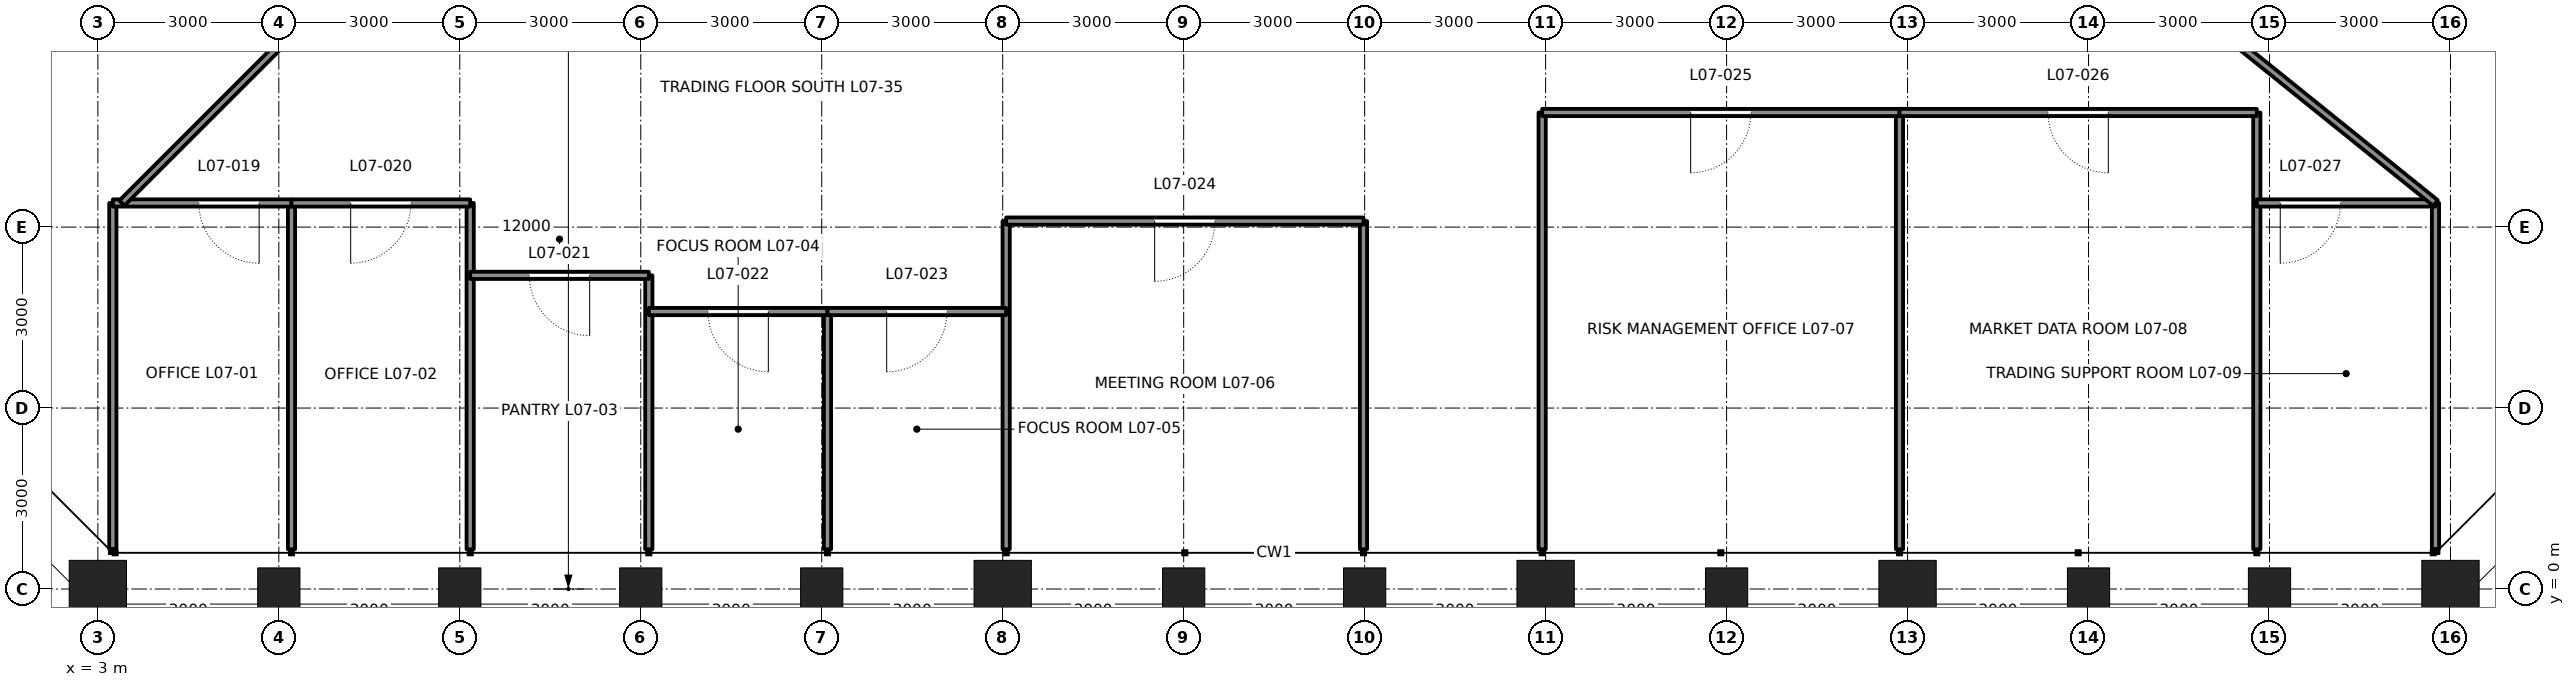
"""IFC4 building model, lengths in metres.
Left out: names, types, materials, properties, quantities, classifications, styles, units other than length and angle.
Written with IfcOpenShell. Run it as: python <this file> out.ifc"""

import sys

from ifc_helpers import new_model, si_unit, direction, frame, frame_2d, origin, origin_2d, place, context, subcontext, project, spatial, rectangle, hollow_rectangle, extrude, element, fill, save


model = new_model("IFC4")
c1 = context("Model", 3, precision=1e-05, world=origin(), true_north=direction((0.0, 1.0)))
c2 = subcontext(c1, "Body", "Model", "MODEL_VIEW")
j1 = project(units=[si_unit("LENGTHUNIT", "METRE"), si_unit("PLANEANGLEUNIT", "RADIAN")], contexts=[c1])
p1 = place(None, origin())
s1 = spatial("IfcSite", under=j1, at=p1, CompositionType="ELEMENT")
p2 = place(p1, origin())
s2 = spatial("IfcBuilding", under=s1, at=p2, CompositionType="ELEMENT")
p3 = place(p2, frame((0.0, 0.0, 37.8)))
s3 = spatial("IfcBuildingStorey", under=s2, at=p3, CompositionType="ELEMENT", Elevation=37.8)
p4 = place(p3, frame((3.0, 0.0, 0.0), z_axis=(0.0, 0.0, 1.0), x_axis=(0.0, -1.0, 0.0)))
e1 = element("IfcColumn", 1, at=p4, inside=s3, PredefinedType="COLUMN", context=c2, shape_type="SweptSolid", body=[
    extrude(hollow_rectangle(XDim=0.95, YDim=0.95, WallThickness=0.095, at=origin_2d()), origin(), (0.0, 0.0, 1.0), 4.5),
])
for number, where, z_axis, x_axis in (
    (2, (6.0, 0.0, 0.0), (0.0, 0.0, 1.0), (0.0, -1.0, 0.0)),
    (3, (9.0, 0.0, 0.0), (0.0, 0.0, 1.0), (0.0, -1.0, 0.0)),
    (4, (12.0, 0.0, 0.0), (0.0, 0.0, 1.0), (0.0, -1.0, 0.0)),
    (5, (15.0, 0.0, 0.0), (0.0, 0.0, 1.0), (0.0, -1.0, 0.0)),
):
    element("IfcColumn", number, at=place(p3, frame(where, z_axis=z_axis, x_axis=x_axis)), inside=s3, PredefinedType="COLUMN", context=c2, shape_type="SweptSolid", body=[
        extrude(hollow_rectangle(XDim=0.7, YDim=0.7, WallThickness=0.07, at=origin_2d()), origin(), (0.0, 0.0, 1.0), 4.5),
    ])
p5 = place(p3, frame((18.0, 0.0, 0.0), z_axis=(0.0, 0.0, 1.0), x_axis=(0.0, -1.0, 0.0)))
e6 = element("IfcColumn", 6, at=p5, inside=s3, PredefinedType="COLUMN", context=c2, shape_type="SweptSolid", body=[
    extrude(hollow_rectangle(XDim=0.95, YDim=0.95, WallThickness=0.11, at=origin_2d()), origin(), (0.0, 0.0, 1.0), 4.5),
])
for number, where, z_axis, x_axis in (
    (7, (21.0, 0.0, 0.0), (0.0, 0.0, 1.0), (0.0, -1.0, 0.0)),
    (8, (24.0, 0.0, 0.0), (0.0, 0.0, 1.0), (0.0, -1.0, 0.0)),
):
    element("IfcColumn", number, at=place(p3, frame(where, z_axis=z_axis, x_axis=x_axis)), inside=s3, PredefinedType="COLUMN", context=c2, shape_type="SweptSolid", body=[
        extrude(hollow_rectangle(XDim=0.7, YDim=0.7, WallThickness=0.07, at=origin_2d()), origin(), (0.0, 0.0, 1.0), 4.5),
    ])
p6 = place(p3, frame((27.0, 0.0, 0.0), z_axis=(0.0, 0.0, 1.0), x_axis=(0.0, -1.0, 0.0)))
e9 = element("IfcColumn", 9, at=p6, inside=s3, PredefinedType="COLUMN", context=c2, shape_type="SweptSolid", body=[
    extrude(hollow_rectangle(XDim=0.95, YDim=0.95, WallThickness=0.11, at=origin_2d()), origin(), (0.0, 0.0, 1.0), 4.5),
])
p7 = place(p3, frame((30.0, 0.0, 0.0), z_axis=(0.0, 0.0, 1.0), x_axis=(0.0, -1.0, 0.0)))
e10 = element("IfcColumn", 10, at=p7, inside=s3, PredefinedType="COLUMN", context=c2, shape_type="SweptSolid", body=[
    extrude(hollow_rectangle(XDim=0.7, YDim=0.7, WallThickness=0.07, at=origin_2d()), origin(), (0.0, 0.0, 1.0), 4.5),
])
p8 = place(p3, frame((33.0, 0.0, 0.0), z_axis=(0.0, 0.0, 1.0), x_axis=(0.0, -1.0, 0.0)))
e11 = element("IfcColumn", 11, at=p8, inside=s3, PredefinedType="COLUMN", context=c2, shape_type="SweptSolid", body=[
    extrude(hollow_rectangle(XDim=0.95, YDim=0.95, WallThickness=0.11, at=origin_2d()), origin(), (0.0, 0.0, 1.0), 4.5),
])
for number, where, z_axis, x_axis in (
    (12, (36.0, 0.0, 0.0), (0.0, 0.0, 1.0), (0.0, -1.0, 0.0)),
    (13, (39.0, 0.0, 0.0), (0.0, 0.0, 1.0), (0.0, -1.0, 0.0)),
):
    element("IfcColumn", number, at=place(p3, frame(where, z_axis=z_axis, x_axis=x_axis)), inside=s3, PredefinedType="COLUMN", context=c2, shape_type="SweptSolid", body=[
        extrude(hollow_rectangle(XDim=0.7, YDim=0.7, WallThickness=0.07, at=origin_2d()), origin(), (0.0, 0.0, 1.0), 4.5),
    ])
p9 = place(p3, frame((42.0, 0.0, 0.0), z_axis=(0.0, 0.0, 1.0), x_axis=(0.0, -1.0, 0.0)))
e14 = element("IfcColumn", 14, at=p9, inside=s3, PredefinedType="COLUMN", context=c2, shape_type="SweptSolid", body=[
    extrude(hollow_rectangle(XDim=0.95, YDim=0.95, WallThickness=0.095, at=origin_2d()), origin(), (0.0, 0.0, 1.0), 4.5),
])
p10 = place(p3, frame((3.249, 0.666, -0.3), z_axis=(0.0, 0.0, 1.0), x_axis=(0.0, 1.0, 0.0)))
e15 = element("IfcWall", 15, at=p10, inside=s3, PredefinedType="PARTITIONING", context=c2, shape_type="SweptSolid", body=[
    extrude(rectangle(XDim=5.734, YDim=0.12, at=frame_2d((2.867, 0.0))), origin(), (0.0, 0.0, 1.0), 4.34),
])
for number, where, z_axis, x_axis in (
    (16, (6.21, 0.657, -0.3), (0.0, 0.0, 1.0), (0.0, 1.0, 0.0)),
    (17, (9.172, 0.657, -0.3), (0.0, 0.0, 1.0), (0.0, 1.0, 0.0)),
):
    element("IfcWall", number, at=place(p3, frame(where, z_axis=z_axis, x_axis=x_axis)), inside=s3, PredefinedType="PARTITIONING", context=c2, shape_type="SweptSolid", body=[
        extrude(rectangle(XDim=5.742, YDim=0.12, at=frame_2d((2.871, 0.0))), origin(), (0.0, 0.0, 1.0), 4.34),
    ])
p11 = place(p3, frame((12.134, 0.657, -0.3), z_axis=(0.0, 0.0, 1.0), x_axis=(0.0, 1.0, 0.0)))
e18 = element("IfcWall", 18, at=p11, inside=s3, PredefinedType="PARTITIONING", context=c2, shape_type="SweptSolid", body=[
    extrude(rectangle(XDim=4.542, YDim=0.12, at=frame_2d((2.271, 0.0))), origin(), (0.0, 0.0, 1.0), 3.481),
])
p12 = place(p3, frame((15.096, 0.657, -0.3), z_axis=(0.0, 0.0, 1.0), x_axis=(0.0, 1.0, 0.0)))
e19 = element("IfcWall", 19, at=p12, inside=s3, PredefinedType="PARTITIONING", context=c2, shape_type="SweptSolid", body=[
    extrude(rectangle(XDim=3.943, YDim=0.12, at=frame_2d((1.971, 0.0))), origin(), (0.0, 0.0, 1.0), 3.646),
])
for number, where, z_axis, x_axis in (
    (20, (18.057, 0.657, -0.3), (0.0, 0.0, 1.0), (0.0, 1.0, 0.0)),
    (21, (23.981, 0.657, -0.3), (0.0, 0.0, 1.0), (0.0, 1.0, 0.0)),
):
    element("IfcWall", number, at=place(p3, frame(where, z_axis=z_axis, x_axis=x_axis)), inside=s3, PredefinedType="PARTITIONING", context=c2, shape_type="SweptSolid", body=[
        extrude(rectangle(XDim=5.443, YDim=0.12, at=frame_2d((2.721, 0.0))), origin(), (0.0, 0.0, 1.0), 3.646),
    ])
p13 = place(p3, frame((26.943, 0.657, -0.3), z_axis=(0.0, 0.0, 1.0), x_axis=(0.0, 1.0, 0.0)))
e22 = element("IfcWall", 22, at=p13, inside=s3, PredefinedType="PARTITIONING", context=c2, shape_type="SweptSolid", body=[
    extrude(rectangle(XDim=7.242, YDim=0.12, at=frame_2d((3.621, 0.0))), origin(), (0.0, 0.0, 1.0), 3.646),
])
p14 = place(p3, frame((32.866, 0.657, -0.3), z_axis=(0.0, 0.0, 1.0), x_axis=(0.0, 1.0, 0.0)))
e23 = element("IfcWall", 23, at=p14, inside=s3, PredefinedType="PARTITIONING", context=c2, shape_type="SweptSolid", body=[
    extrude(rectangle(XDim=7.242, YDim=0.12, at=frame_2d((3.621, 0.0))), origin(), (0.0, 0.0, 1.0), 3.481),
])
p15 = place(p3, frame((38.79, 0.657, -0.3), z_axis=(0.0, 0.0, 1.0), x_axis=(0.0, 1.0, 0.0)))
e24 = element("IfcWall", 24, at=p15, inside=s3, PredefinedType="PARTITIONING", context=c2, shape_type="SweptSolid", body=[
    extrude(rectangle(XDim=7.242, YDim=0.12, at=frame_2d((3.621, 0.0))), origin(), (0.0, 0.0, 1.0), 4.34),
])
p16 = place(p3, frame((41.751, 0.666, -0.3), z_axis=(0.0, 0.0, 1.0), x_axis=(0.0, 1.0, 0.0)))
e25 = element("IfcWall", 25, at=p16, inside=s3, PredefinedType="PARTITIONING", context=c2, shape_type="SweptSolid", body=[
    extrude(rectangle(XDim=5.734, YDim=0.12, at=frame_2d((2.867, 0.0))), origin(), (0.0, 0.0, 1.0), 4.34),
])
p17 = place(p3, frame((3.249, 6.4, -0.3), z_axis=(0.0, 0.0, 1.0), x_axis=(1.0, 0.0, 0.0)))
e26 = element("IfcWall", 26, at=p17, inside=s3, PredefinedType="PARTITIONING", context=c2, shape_type="SweptSolid", body=[
    extrude(rectangle(XDim=2.962, YDim=0.12, at=frame_2d((1.481, 0.0))), origin(), (0.0, 0.0, 1.0), 4.34),
])
p18 = place(p17, frame((1.425, 0.0, 0.3)))
e27 = element("IfcOpeningElement", 27, at=p18, cuts=e26, PredefinedType="OPENING", context=c2, shape_type="SweptSolid", body=[
    extrude(rectangle(XDim=1.0, YDim=2.4, at=frame_2d((0.5, 1.2))), frame((0.0, 0.07, 0.0), z_axis=(0.0, -1.0, 0.0), x_axis=(1.0, 0.0, 0.0)), (0.0, 0.0, 1.0), 0.14),
])
p19 = place(p3, frame((6.21, 6.4, -0.3), z_axis=(0.0, 0.0, 1.0), x_axis=(1.0, 0.0, 0.0)))
e28 = element("IfcWall", 28, at=p19, inside=s3, PredefinedType="PARTITIONING", context=c2, shape_type="SweptSolid", body=[
    extrude(rectangle(XDim=2.962, YDim=0.12, at=frame_2d((1.481, 0.0))), origin(), (0.0, 0.0, 1.0), 4.34),
])
p20 = place(p19, frame((0.981, 0.0, 0.3)))
e29 = element("IfcOpeningElement", 29, at=p20, cuts=e28, PredefinedType="OPENING", context=c2, shape_type="SweptSolid", body=[
    extrude(rectangle(XDim=1.0, YDim=2.4, at=frame_2d((0.5, 1.2))), frame((0.0, 0.07, 0.0), z_axis=(0.0, -1.0, 0.0), x_axis=(1.0, 0.0, 0.0)), (0.0, 0.0, 1.0), 0.14),
])
p21 = place(p3, frame((9.172, 5.2, -0.3), z_axis=(0.0, 0.0, 1.0), x_axis=(1.0, 0.0, 0.0)))
e30 = element("IfcWall", 30, at=p21, inside=s3, PredefinedType="PARTITIONING", context=c2, shape_type="SweptSolid", body=[
    extrude(rectangle(XDim=2.962, YDim=0.12, at=frame_2d((1.481, 0.0))), origin(), (0.0, 0.0, 1.0), 4.34),
])
p22 = place(p21, frame((0.981, 0.0, 0.3)))
e31 = element("IfcOpeningElement", 31, at=p22, cuts=e30, PredefinedType="OPENING", context=c2, shape_type="SweptSolid", body=[
    extrude(rectangle(XDim=1.0, YDim=2.4, at=frame_2d((0.5, 1.2))), frame((0.0, 0.07, 0.0), z_axis=(0.0, -1.0, 0.0), x_axis=(1.0, 0.0, 0.0)), (0.0, 0.0, 1.0), 0.14),
])
p23 = place(p3, frame((12.134, 4.6, -0.3), z_axis=(0.0, 0.0, 1.0), x_axis=(1.0, 0.0, 0.0)))
e32 = element("IfcWall", 32, at=p23, inside=s3, PredefinedType="PARTITIONING", context=c2, shape_type="SweptSolid", body=[
    extrude(rectangle(XDim=2.962, YDim=0.12, at=frame_2d((1.481, 0.0))), origin(), (0.0, 0.0, 1.0), 4.34),
])
p24 = place(p23, frame((0.981, 0.0, 0.3)))
e33 = element("IfcOpeningElement", 33, at=p24, cuts=e32, PredefinedType="OPENING", context=c2, shape_type="SweptSolid", body=[
    extrude(rectangle(XDim=1.0, YDim=2.4, at=frame_2d((0.5, 1.2))), frame((0.0, 0.07, 0.0), z_axis=(0.0, -1.0, 0.0), x_axis=(1.0, 0.0, 0.0)), (0.0, 0.0, 1.0), 0.14),
])
p25 = place(p3, frame((15.096, 4.6, -0.3), z_axis=(0.0, 0.0, 1.0), x_axis=(1.0, 0.0, 0.0)))
e34 = element("IfcWall", 34, at=p25, inside=s3, PredefinedType="PARTITIONING", context=c2, shape_type="SweptSolid", body=[
    extrude(rectangle(XDim=2.962, YDim=0.12, at=frame_2d((1.481, 0.0))), origin(), (0.0, 0.0, 1.0), 4.34),
])
p26 = place(p25, frame((0.981, 0.0, 0.3)))
e35 = element("IfcOpeningElement", 35, at=p26, cuts=e34, PredefinedType="OPENING", context=c2, shape_type="SweptSolid", body=[
    extrude(rectangle(XDim=1.0, YDim=2.4, at=frame_2d((0.5, 1.2))), frame((0.0, 0.07, 0.0), z_axis=(0.0, -1.0, 0.0), x_axis=(1.0, 0.0, 0.0)), (0.0, 0.0, 1.0), 0.14),
])
p27 = place(p3, frame((18.057, 6.1, -0.3), z_axis=(0.0, 0.0, 1.0), x_axis=(1.0, 0.0, 0.0)))
e36 = element("IfcWall", 36, at=p27, inside=s3, PredefinedType="PARTITIONING", context=c2, shape_type="SweptSolid", body=[
    extrude(rectangle(XDim=5.924, YDim=0.12, at=frame_2d((2.962, 0.0))), origin(), (0.0, 0.0, 1.0), 4.34),
])
p28 = place(p27, frame((2.462, 0.0, 0.3)))
e37 = element("IfcOpeningElement", 37, at=p28, cuts=e36, PredefinedType="OPENING", context=c2, shape_type="SweptSolid", body=[
    extrude(rectangle(XDim=1.0, YDim=2.4, at=frame_2d((0.5, 1.2))), frame((0.0, 0.07, 0.0), z_axis=(0.0, -1.0, 0.0), x_axis=(1.0, 0.0, 0.0)), (0.0, 0.0, 1.0), 0.14),
])
p29 = place(p3, frame((26.943, 7.9, -0.3), z_axis=(0.0, 0.0, 1.0), x_axis=(1.0, 0.0, 0.0)))
e38 = element("IfcWall", 38, at=p29, inside=s3, PredefinedType="PARTITIONING", context=c2, shape_type="SweptSolid", body=[
    extrude(rectangle(XDim=5.924, YDim=0.12, at=frame_2d((2.962, 0.0))), origin(), (0.0, 0.0, 1.0), 4.34),
])
p30 = place(p29, frame((2.462, 0.0, 0.3)))
e39 = element("IfcOpeningElement", 39, at=p30, cuts=e38, PredefinedType="OPENING", context=c2, shape_type="SweptSolid", body=[
    extrude(rectangle(XDim=1.0, YDim=2.4, at=frame_2d((0.5, 1.2))), frame((0.0, 0.07, 0.0), z_axis=(0.0, -1.0, 0.0), x_axis=(1.0, 0.0, 0.0)), (0.0, 0.0, 1.0), 0.14),
])
p31 = place(p3, frame((32.866, 7.9, -0.3), z_axis=(0.0, 0.0, 1.0), x_axis=(1.0, 0.0, 0.0)))
e40 = element("IfcWall", 40, at=p31, inside=s3, PredefinedType="PARTITIONING", context=c2, shape_type="SweptSolid", body=[
    extrude(rectangle(XDim=5.924, YDim=0.12, at=frame_2d((2.962, 0.0))), origin(), (0.0, 0.0, 1.0), 4.34),
])
p32 = place(p31, frame((2.462, 0.0, 0.3)))
e41 = element("IfcOpeningElement", 41, at=p32, cuts=e40, PredefinedType="OPENING", context=c2, shape_type="SweptSolid", body=[
    extrude(rectangle(XDim=1.0, YDim=2.4, at=frame_2d((0.5, 1.2))), frame((0.0, 0.07, 0.0), z_axis=(0.0, -1.0, 0.0), x_axis=(1.0, 0.0, 0.0)), (0.0, 0.0, 1.0), 0.14),
])
p33 = place(p3, frame((38.79, 6.4, -0.3), z_axis=(0.0, 0.0, 1.0), x_axis=(1.0, 0.0, 0.0)))
e42 = element("IfcWall", 42, at=p33, inside=s3, PredefinedType="PARTITIONING", context=c2, shape_type="SweptSolid", body=[
    extrude(rectangle(XDim=2.962, YDim=0.12, at=frame_2d((1.481, 0.0))), origin(), (0.0, 0.0, 1.0), 4.34),
])
p34 = place(p33, frame((0.388, 0.0, 0.3)))
e43 = element("IfcOpeningElement", 43, at=p34, cuts=e42, PredefinedType="OPENING", context=c2, shape_type="SweptSolid", body=[
    extrude(rectangle(XDim=1.0, YDim=2.4, at=frame_2d((0.5, 1.2))), frame((0.0, 0.07, 0.0), z_axis=(0.0, -1.0, 0.0), x_axis=(1.0, 0.0, 0.0)), (0.0, 0.0, 1.0), 0.14),
])
p35 = place(p3, frame((9.0, 12.0, -0.3), z_axis=(0.0, 0.0, 1.0), x_axis=(-0.707106781187, -0.707106781187, 0.0)))
e44 = element("IfcWall", 44, at=p35, inside=s3, PredefinedType="PARTITIONING", context=c2, shape_type="SweptSolid", body=[
    extrude(rectangle(XDim=7.921, YDim=0.12, at=frame_2d((3.96, 0.0))), origin(), (0.0, 0.0, 1.0), 4.34),
])
p36 = place(p35, frame((1.3, 0.0, 0.3)))
e45 = element("IfcOpeningElement", 45, at=p36, cuts=e44, PredefinedType="OPENING", context=c2, shape_type="SweptSolid", body=[
    extrude(rectangle(XDim=1.0, YDim=2.4, at=frame_2d((0.5, 1.2))), frame((0.0, 0.07, 0.0), z_axis=(0.0, -1.0, 0.0), x_axis=(1.0, 0.0, 0.0)), (0.0, 0.0, 1.0), 0.14),
])
p37 = place(p3, frame((34.8, 12.0, -0.3), z_axis=(0.0, 0.0, 1.0), x_axis=(0.778734980058, -0.627353035247, 0.0)))
e46 = element("IfcWall", 46, at=p37, inside=s3, PredefinedType="PARTITIONING", context=c2, shape_type="SweptSolid", body=[
    extrude(rectangle(XDim=8.927, YDim=0.12, at=frame_2d((4.463, 0.0))), origin(), (0.0, 0.0, 1.0), 4.34),
])
p38 = place(p37, frame((1.529, 0.0, 0.3)))
e47 = element("IfcOpeningElement", 47, at=p38, cuts=e46, PredefinedType="OPENING", context=c2, shape_type="SweptSolid", body=[
    extrude(rectangle(XDim=1.0, YDim=2.4, at=frame_2d((0.5, 1.2))), frame((0.0, 0.07, 0.0), z_axis=(0.0, -1.0, 0.0), x_axis=(1.0, 0.0, 0.0)), (0.0, 0.0, 1.0), 0.14),
])
p39 = place(p18, frame((1.0, 0.0, 0.0), z_axis=(0.0, 0.0, 1.0), x_axis=(-1.0, 0.0, 0.0)))
e48 = element("IfcDoor", 48, at=p39, inside=s3, OperationType="SINGLE_SWING_LEFT", PredefinedType="DOOR", context=c2, shape_type="SweptSolid", body=[
    extrude(rectangle(XDim=1.0, YDim=2.4, at=frame_2d((0.5, 1.2))), frame((0.0, 0.025, 0.0), z_axis=(0.0, -1.0, 0.0), x_axis=(1.0, 0.0, 0.0)), (0.0, 0.0, 1.0), 0.05),
])
fill(e27, e48)
p40 = place(p20, frame((1.0, 0.0, 0.0), z_axis=(0.0, 0.0, 1.0), x_axis=(-1.0, 0.0, 0.0)))
e49 = element("IfcDoor", 49, at=p40, inside=s3, OperationType="SINGLE_SWING_RIGHT", PredefinedType="DOOR", context=c2, shape_type="SweptSolid", body=[
    extrude(rectangle(XDim=1.0, YDim=2.4, at=frame_2d((0.5, 1.2))), frame((0.0, 0.025, 0.0), z_axis=(0.0, -1.0, 0.0), x_axis=(1.0, 0.0, 0.0)), (0.0, 0.0, 1.0), 0.05),
])
fill(e29, e49)
p41 = place(p22, frame((1.0, 0.0, 0.0), z_axis=(0.0, 0.0, 1.0), x_axis=(-1.0, 0.0, 0.0)))
e50 = element("IfcDoor", 50, at=p41, inside=s3, OperationType="SINGLE_SWING_LEFT", PredefinedType="DOOR", context=c2, shape_type="SweptSolid", body=[
    extrude(rectangle(XDim=1.0, YDim=2.4, at=frame_2d((0.5, 1.2))), frame((0.0, 0.025, 0.0), z_axis=(0.0, -1.0, 0.0), x_axis=(1.0, 0.0, 0.0)), (0.0, 0.0, 1.0), 0.05),
])
fill(e31, e50)
p42 = place(p24, frame((1.0, 0.0, 0.0), z_axis=(0.0, 0.0, 1.0), x_axis=(-1.0, 0.0, 0.0)))
e51 = element("IfcDoor", 51, at=p42, inside=s3, OperationType="SINGLE_SWING_LEFT", PredefinedType="DOOR", context=c2, shape_type="SweptSolid", body=[
    extrude(rectangle(XDim=1.0, YDim=2.4, at=frame_2d((0.5, 1.2))), frame((0.0, 0.025, 0.0), z_axis=(0.0, -1.0, 0.0), x_axis=(1.0, 0.0, 0.0)), (0.0, 0.0, 1.0), 0.05),
])
fill(e33, e51)
p43 = place(p26, frame((1.0, 0.0, 0.0), z_axis=(0.0, 0.0, 1.0), x_axis=(-1.0, 0.0, 0.0)))
e52 = element("IfcDoor", 52, at=p43, inside=s3, OperationType="SINGLE_SWING_RIGHT", PredefinedType="DOOR", context=c2, shape_type="SweptSolid", body=[
    extrude(rectangle(XDim=1.0, YDim=2.4, at=frame_2d((0.5, 1.2))), frame((0.0, 0.025, 0.0), z_axis=(0.0, -1.0, 0.0), x_axis=(1.0, 0.0, 0.0)), (0.0, 0.0, 1.0), 0.05),
])
fill(e35, e52)
p44 = place(p28, frame((1.0, 0.0, 0.0), z_axis=(0.0, 0.0, 1.0), x_axis=(-1.0, 0.0, 0.0)))
e53 = element("IfcDoor", 53, at=p44, inside=s3, OperationType="SINGLE_SWING_RIGHT", PredefinedType="DOOR", context=c2, shape_type="SweptSolid", body=[
    extrude(rectangle(XDim=1.0, YDim=2.4, at=frame_2d((0.5, 1.2))), frame((0.0, 0.025, 0.0), z_axis=(0.0, -1.0, 0.0), x_axis=(1.0, 0.0, 0.0)), (0.0, 0.0, 1.0), 0.05),
])
fill(e37, e53)
p45 = place(p30, frame((1.0, 0.0, 0.0), z_axis=(0.0, 0.0, 1.0), x_axis=(-1.0, 0.0, 0.0)))
e54 = element("IfcDoor", 54, at=p45, inside=s3, OperationType="SINGLE_SWING_RIGHT", PredefinedType="DOOR", context=c2, shape_type="SweptSolid", body=[
    extrude(rectangle(XDim=1.0, YDim=2.4, at=frame_2d((0.5, 1.2))), frame((0.0, 0.025, 0.0), z_axis=(0.0, -1.0, 0.0), x_axis=(1.0, 0.0, 0.0)), (0.0, 0.0, 1.0), 0.05),
])
fill(e39, e54)
p46 = place(p32, frame((1.0, 0.0, 0.0), z_axis=(0.0, 0.0, 1.0), x_axis=(-1.0, 0.0, 0.0)))
e55 = element("IfcDoor", 55, at=p46, inside=s3, OperationType="SINGLE_SWING_LEFT", PredefinedType="DOOR", context=c2, shape_type="SweptSolid", body=[
    extrude(rectangle(XDim=1.0, YDim=2.4, at=frame_2d((0.5, 1.2))), frame((0.0, 0.025, 0.0), z_axis=(0.0, -1.0, 0.0), x_axis=(1.0, 0.0, 0.0)), (0.0, 0.0, 1.0), 0.05),
])
fill(e41, e55)
p47 = place(p34, frame((1.0, 0.0, 0.0), z_axis=(0.0, 0.0, 1.0), x_axis=(-1.0, 0.0, 0.0)))
e56 = element("IfcDoor", 56, at=p47, inside=s3, OperationType="SINGLE_SWING_RIGHT", PredefinedType="DOOR", context=c2, shape_type="SweptSolid", body=[
    extrude(rectangle(XDim=1.0, YDim=2.4, at=frame_2d((0.5, 1.2))), frame((0.0, 0.025, 0.0), z_axis=(0.0, -1.0, 0.0), x_axis=(1.0, 0.0, 0.0)), (0.0, 0.0, 1.0), 0.05),
])
fill(e43, e56)
save(model, sys.argv[1])
